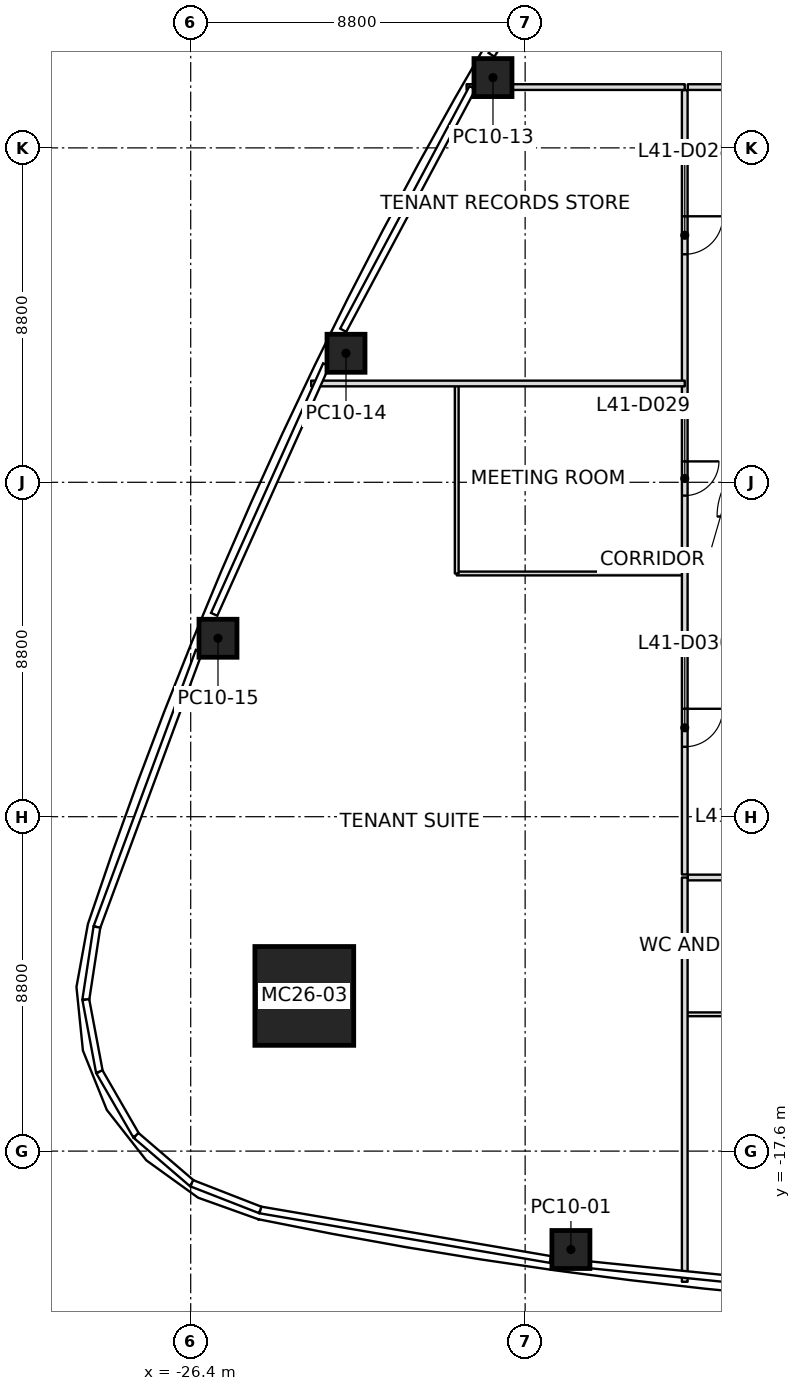
"""IFC4 building model, lengths in metres.
Left out: names, types, materials, properties, quantities, classifications, styles, units other than length and angle.
Written with IfcOpenShell. Run it as: python <this file> out.ifc"""

import sys

from ifc_helpers import new_model, si_unit, direction, frame, frame_2d, origin, origin_2d, place, context, subcontext, project, spatial, rectangle, extrude, element, fill, save


model = new_model("IFC4")
c1 = context("Model", 3, precision=1e-05, world=origin(), true_north=direction((0.0, 1.0)))
c2 = subcontext(c1, "Body", "Model", "MODEL_VIEW")
j1 = project(units=[si_unit("LENGTHUNIT", "METRE"), si_unit("PLANEANGLEUNIT", "RADIAN")], contexts=[c1])
p1 = place(None, origin())
s1 = spatial("IfcSite", under=j1, at=p1, CompositionType="ELEMENT")
p2 = place(p1, origin())
s2 = spatial("IfcBuilding", under=s1, at=p2, CompositionType="ELEMENT")
p3 = place(p2, frame((0.0, 0.0, 185.8)))
s3 = spatial("IfcBuildingStorey", under=s2, at=p3, CompositionType="ELEMENT", Elevation=185.8)
p4 = place(p3, frame((-23.411, -13.516, 0.0), z_axis=(0.028000489904, 0.016165860184, 0.999477182096), x_axis=(0.999607909415, -0.000452829555, -0.027996828039)))
e1 = element("IfcColumn", 1, at=p4, inside=s3, PredefinedType="COLUMN", context=c2, shape_type="SweptSolid", body=[
    extrude(rectangle(XDim=2.6, YDim=2.6, at=origin_2d()), origin(), (0.0, 0.0, 1.0), 4.002),
])
p5 = place(p3, frame((-16.396, -20.189, 0.0), z_axis=(0.017635456472, 0.010434820265, 0.999790030557), x_axis=(-0.990707564841, 0.135057082861, 0.016065657048)))
e2 = element("IfcColumn", 2, at=p5, inside=s3, PredefinedType="COLUMN", context=c2, shape_type="SweptSolid", body=[
    extrude(rectangle(XDim=1.0, YDim=1.0, at=origin_2d()), origin(), (0.0, 0.0, 1.0), 4.001),
])
p6 = place(p3, frame((-18.446, 10.65, 0.0), z_axis=(0.009887052741, -0.005675900648, 0.999935013058), x_axis=(0.49997556095, 0.866039512773, -2.7732311e-05)))
e3 = element("IfcColumn", 3, at=p6, inside=s3, PredefinedType="COLUMN", context=c2, shape_type="SweptSolid", body=[
    extrude(rectangle(XDim=1.0, YDim=1.0, at=origin_2d()), origin(), (0.0, 0.0, 1.0), 4.0),
])
p7 = place(p3, frame((-22.314, 3.395, 0.0), z_axis=(0.014097689605, 0.002074984617, 0.999898469639), x_axis=(0.440273105663, 0.897827632309, -0.008070631525)))
e4 = element("IfcColumn", 4, at=p7, inside=s3, PredefinedType="COLUMN", context=c2, shape_type="SweptSolid", body=[
    extrude(rectangle(XDim=1.0, YDim=1.0, at=origin_2d()), origin(), (0.0, 0.0, 1.0), 4.0),
])
p8 = place(p3, frame((-25.682, -4.104, 0.0), z_axis=(0.0178795464, 0.010007664197, 0.999790062202), x_axis=(0.378559017413, 0.925438276421, -0.016033305019)))
e5 = element("IfcColumn", 5, at=p8, inside=s3, PredefinedType="COLUMN", context=c2, shape_type="SweptSolid", body=[
    extrude(rectangle(XDim=1.0, YDim=1.0, at=origin_2d()), origin(), (0.0, 0.0, 1.0), 4.001),
])
p9 = place(p3, frame((-13.4, 2.6, 0.0), z_axis=(0.0, 0.0, 1.0), x_axis=(-1.0, 0.0, 0.0)))
e6 = element("IfcWall", 6, at=p9, inside=s3, PredefinedType="PARTITIONING", context=c2, shape_type="SweptSolid", body=[
    extrude(rectangle(XDim=9.83, YDim=0.15, at=frame_2d((4.915, 0.0))), origin(), (0.0, 0.0, 1.0), 3.084),
])
p10 = place(p3, frame((-13.4, 10.4, 0.0), z_axis=(0.0, 0.0, 1.0), x_axis=(-1.0, 0.0, 0.0)))
e7 = element("IfcWall", 7, at=p10, inside=s3, PredefinedType="PARTITIONING", context=c2, shape_type="SweptSolid", body=[
    extrude(rectangle(XDim=5.74, YDim=0.15, at=frame_2d((2.87, 0.0))), origin(), (0.0, 0.0, 1.0), 3.3),
])
p11 = place(p3, frame((-13.4, -10.4, 0.0), z_axis=(0.0, 0.0, 1.0), x_axis=(0.0, -1.0, 0.0)))
e8 = element("IfcWall", 8, at=p11, inside=s3, PredefinedType="PARTITIONING", context=c2, shape_type="SweptSolid", body=[
    extrude(rectangle(XDim=10.639, YDim=0.15, at=frame_2d((5.319, 0.0))), origin(), (0.0, 0.0, 1.0), 3.234),
])
p12 = place(p3, frame((-13.4, 10.32, 0.0), z_axis=(0.0, 0.0, 1.0), x_axis=(0.0, -1.0, 0.0)))
e9 = element("IfcWall", 9, at=p12, inside=s3, PredefinedType="PARTITIONING", context=c2, shape_type="SweptSolid", body=[
    extrude(rectangle(XDim=20.64, YDim=0.15, at=frame_2d((10.32, 0.0))), origin(), (0.0, 0.0, 1.0), 3.097),
])
p13 = place(p12, frame((3.32, 0.0, 0.0)))
e10 = element("IfcOpeningElement", 10, at=p13, cuts=e9, PredefinedType="OPENING", context=c2, shape_type="SweptSolid", body=[
    extrude(rectangle(XDim=1.0, YDim=2.1, at=frame_2d((0.5, 1.05))), frame((0.0, 0.075, 0.0), z_axis=(0.0, -1.0, 0.0), x_axis=(1.0, 0.0, 0.0)), (0.0, 0.0, 1.0), 0.15),
])
p14 = place(p12, frame((9.77, 0.0, 0.0)))
e11 = element("IfcOpeningElement", 11, at=p14, cuts=e9, PredefinedType="OPENING", context=c2, shape_type="SweptSolid", body=[
    extrude(rectangle(XDim=0.9, YDim=2.1, at=frame_2d((0.45, 1.05))), frame((0.0, 0.075, 0.0), z_axis=(0.0, -1.0, 0.0), x_axis=(1.0, 0.0, 0.0)), (0.0, 0.0, 1.0), 0.15),
])
p15 = place(p12, frame((16.28, 0.0, 0.0)))
e12 = element("IfcOpeningElement", 12, at=p15, cuts=e9, PredefinedType="OPENING", context=c2, shape_type="SweptSolid", body=[
    extrude(rectangle(XDim=1.0, YDim=2.1, at=frame_2d((0.5, 1.05))), frame((0.0, 0.075, 0.0), z_axis=(0.0, -1.0, 0.0), x_axis=(1.0, 0.0, 0.0)), (0.0, 0.0, 1.0), 0.15),
])
p16 = place(p3, frame((-13.32, -10.4, 0.0), z_axis=(0.0, 0.0, 1.0), x_axis=(1.0, 0.0, 0.0)))
e13 = element("IfcWall", 13, at=p16, inside=s3, PredefinedType="PARTITIONING", context=c2, shape_type="SweptSolid", body=[
    extrude(rectangle(XDim=26.64, YDim=0.15, at=frame_2d((13.32, 0.0))), origin(), (0.0, 0.0, 1.0), 3.3),
])
p17 = place(p16, frame((0.97, 0.0, 0.0)))
e14 = element("IfcOpeningElement", 14, at=p17, cuts=e13, PredefinedType="OPENING", context=c2, shape_type="SweptSolid", body=[
    extrude(rectangle(XDim=0.9, YDim=2.1, at=frame_2d((0.45, 1.05))), frame((0.0, 0.075, 0.0), z_axis=(0.0, -1.0, 0.0), x_axis=(1.0, 0.0, 0.0)), (0.0, 0.0, 1.0), 0.15),
])
p18 = place(p16, frame((8.62, 0.0, 0.0)))
e15 = element("IfcOpeningElement", 15, at=p18, cuts=e13, PredefinedType="OPENING", context=c2, shape_type="SweptSolid", body=[
    extrude(rectangle(XDim=1.0, YDim=2.1, at=frame_2d((0.5, 1.05))), frame((0.0, 0.075, 0.0), z_axis=(0.0, -1.0, 0.0), x_axis=(1.0, 0.0, 0.0)), (0.0, 0.0, 1.0), 0.15),
])
p19 = place(p16, frame((16.27, 0.0, 0.0)))
e16 = element("IfcOpeningElement", 16, at=p19, cuts=e13, PredefinedType="OPENING", context=c2, shape_type="SweptSolid", body=[
    extrude(rectangle(XDim=0.9, YDim=2.1, at=frame_2d((0.45, 1.05))), frame((0.0, 0.075, 0.0), z_axis=(0.0, -1.0, 0.0), x_axis=(1.0, 0.0, 0.0)), (0.0, 0.0, 1.0), 0.15),
])
p20 = place(p16, frame((22.02, 0.0, 0.0)))
e17 = element("IfcOpeningElement", 17, at=p20, cuts=e13, PredefinedType="OPENING", context=c2, shape_type="SweptSolid", body=[
    extrude(rectangle(XDim=1.0, YDim=2.1, at=frame_2d((0.5, 1.05))), frame((0.0, 0.075, 0.0), z_axis=(0.0, -1.0, 0.0), x_axis=(1.0, 0.0, 0.0)), (0.0, 0.0, 1.0), 0.15),
])
p21 = place(p3, frame((13.32, 10.4, 0.0), z_axis=(0.0, 0.0, 1.0), x_axis=(-1.0, 0.0, 0.0)))
e18 = element("IfcWall", 18, at=p21, inside=s3, PredefinedType="PARTITIONING", context=c2, shape_type="SweptSolid", body=[
    extrude(rectangle(XDim=26.64, YDim=0.15, at=frame_2d((13.32, 0.0))), origin(), (0.0, 0.0, 1.0), 3.097),
])
p22 = place(p21, frame((1.95, 0.0, 0.0)))
e19 = element("IfcOpeningElement", 19, at=p22, cuts=e18, PredefinedType="OPENING", context=c2, shape_type="SweptSolid", body=[
    extrude(rectangle(XDim=0.9, YDim=2.1, at=frame_2d((0.45, 1.05))), frame((0.0, 0.075, 0.0), z_axis=(0.0, -1.0, 0.0), x_axis=(1.0, 0.0, 0.0)), (0.0, 0.0, 1.0), 0.15),
])
p23 = place(p21, frame((9.61, 0.0, 0.0)))
e20 = element("IfcOpeningElement", 20, at=p23, cuts=e18, PredefinedType="OPENING", context=c2, shape_type="SweptSolid", body=[
    extrude(rectangle(XDim=1.0, YDim=2.1, at=frame_2d((0.5, 1.05))), frame((0.0, 0.075, 0.0), z_axis=(0.0, -1.0, 0.0), x_axis=(1.0, 0.0, 0.0)), (0.0, 0.0, 1.0), 0.15),
])
p24 = place(p21, frame((16.87, 0.0, 0.0)))
e21 = element("IfcOpeningElement", 21, at=p24, cuts=e18, PredefinedType="OPENING", context=c2, shape_type="SweptSolid", body=[
    extrude(rectangle(XDim=0.9, YDim=2.1, at=frame_2d((0.45, 1.05))), frame((0.0, 0.075, 0.0), z_axis=(0.0, -1.0, 0.0), x_axis=(1.0, 0.0, 0.0)), (0.0, 0.0, 1.0), 0.15),
])
p25 = place(p21, frame((22.63, 0.0, 0.0)))
e22 = element("IfcOpeningElement", 22, at=p25, cuts=e18, PredefinedType="OPENING", context=c2, shape_type="SweptSolid", body=[
    extrude(rectangle(XDim=1.0, YDim=2.1, at=frame_2d((0.5, 1.05))), frame((0.0, 0.075, 0.0), z_axis=(0.0, -1.0, 0.0), x_axis=(1.0, 0.0, 0.0)), (0.0, 0.0, 1.0), 0.15),
])
p26 = place(p3, frame((-13.43, -2.4, 0.0), z_axis=(0.0, 0.0, 1.0), x_axis=(-1.0, 0.0, 0.0)))
e23 = element("IfcWall", 23, at=p26, inside=s3, PredefinedType="PARTITIONING", context=c2, shape_type="SweptSolid", body=[
    extrude(rectangle(XDim=5.97, YDim=0.1, at=frame_2d((2.985, 0.0))), origin(), (0.0, 0.0, 1.0), 3.167),
])
p27 = place(p3, frame((-19.4, -2.4, 0.0), z_axis=(0.0, 0.0, 1.0), x_axis=(0.0, 1.0, 0.0)))
e24 = element("IfcWall", 24, at=p27, inside=s3, PredefinedType="PARTITIONING", context=c2, shape_type="SweptSolid", body=[
    extrude(rectangle(XDim=4.97, YDim=0.1, at=frame_2d((2.485, 0.0))), origin(), (0.0, 0.0, 1.0), 3.167),
])
p28 = place(p3, frame((-10.4, -14.0, 0.0), z_axis=(0.0, 0.0, 1.0), x_axis=(-1.0, 0.0, 0.0)))
e25 = element("IfcWall", 25, at=p28, inside=s3, PredefinedType="PARTITIONING", context=c2, shape_type="SweptSolid", body=[
    extrude(rectangle(XDim=2.97, YDim=0.1, at=frame_2d((1.485, 0.0))), origin(), (0.0, 0.0, 1.0), 3.3),
])
p29 = place(p13, origin())
e26 = element("IfcDoor", 26, at=p29, inside=s3, OperationType="SINGLE_SWING_LEFT", PredefinedType="DOOR", context=c2, shape_type="SweptSolid", body=[
    extrude(rectangle(XDim=1.0, YDim=2.1, at=frame_2d((0.5, 1.05))), frame((0.0, 0.025, 0.0), z_axis=(0.0, -1.0, 0.0), x_axis=(1.0, 0.0, 0.0)), (0.0, 0.0, 1.0), 0.05),
])
fill(e10, e26)
p30 = place(p14, origin())
e27 = element("IfcDoor", 27, at=p30, inside=s3, OperationType="SINGLE_SWING_RIGHT", PredefinedType="DOOR", context=c2, shape_type="SweptSolid", body=[
    extrude(rectangle(XDim=0.9, YDim=2.1, at=frame_2d((0.45, 1.05))), frame((0.0, 0.025, 0.0), z_axis=(0.0, -1.0, 0.0), x_axis=(1.0, 0.0, 0.0)), (0.0, 0.0, 1.0), 0.05),
])
fill(e11, e27)
p31 = place(p15, origin())
e28 = element("IfcDoor", 28, at=p31, inside=s3, OperationType="SINGLE_SWING_LEFT", PredefinedType="DOOR", context=c2, shape_type="SweptSolid", body=[
    extrude(rectangle(XDim=1.0, YDim=2.1, at=frame_2d((0.5, 1.05))), frame((0.0, 0.025, 0.0), z_axis=(0.0, -1.0, 0.0), x_axis=(1.0, 0.0, 0.0)), (0.0, 0.0, 1.0), 0.05),
])
fill(e12, e28)
save(model, sys.argv[1])
